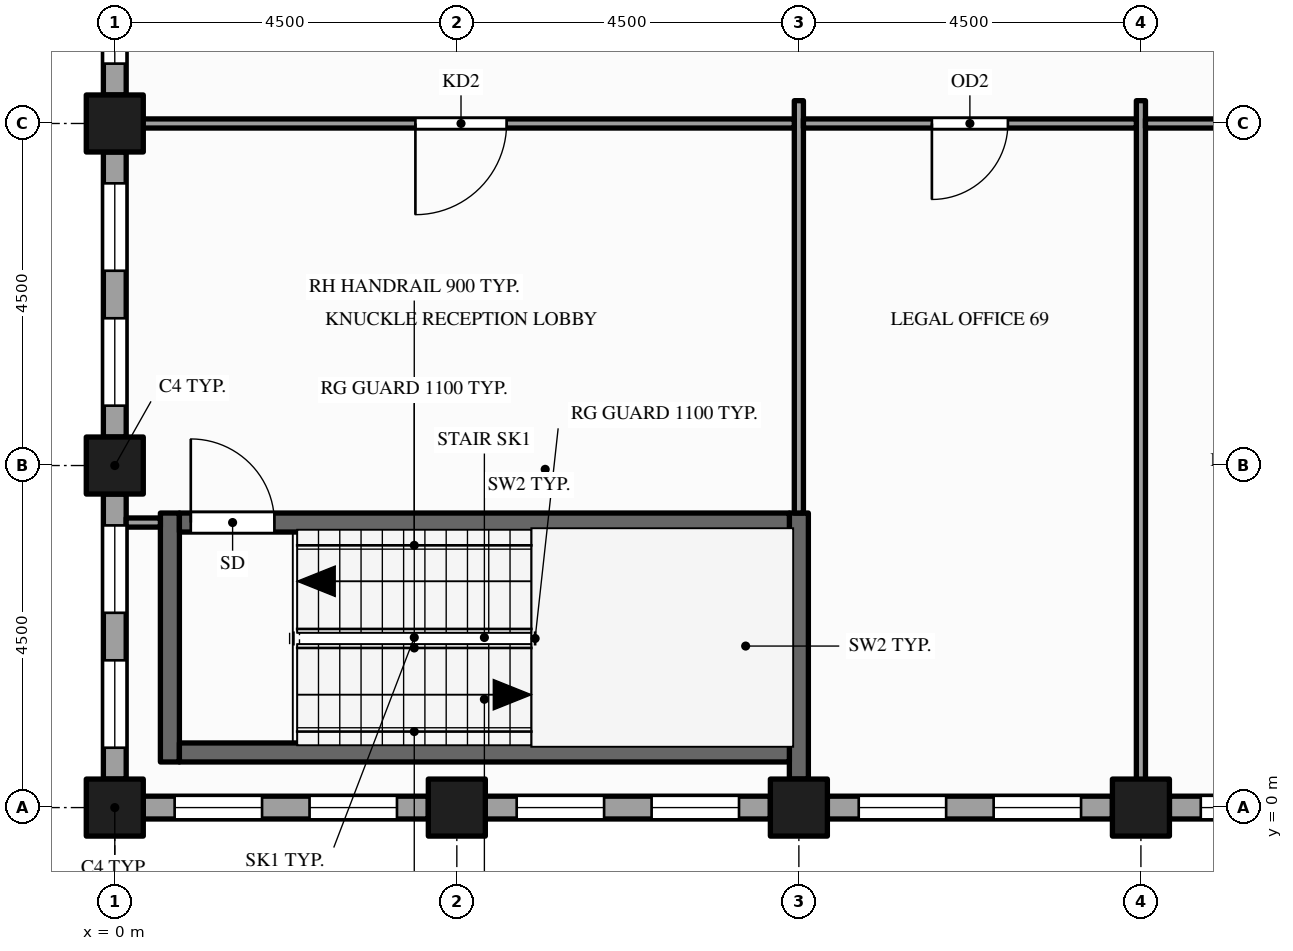
"""IFC4 building model, lengths in metres.
Left out: names, types, materials, properties, quantities, classifications, styles, units other than length and angle.
Written with IfcOpenShell. Run it as: python <this file> out.ifc"""

import sys

from ifc_helpers import new_model, si_unit, direction, frame, frame_2d, origin, origin_2d, place, context, subcontext, project, spatial, rectangle, hollow_rectangle, extrude, element, fill, save


model = new_model("IFC4")
c1 = context("Model", 3, precision=1e-05, world=origin(), true_north=direction((0.0, 1.0)))
c2 = subcontext(c1, "Body", "Model", "MODEL_VIEW")
j1 = project(units=[si_unit("LENGTHUNIT", "METRE"), si_unit("PLANEANGLEUNIT", "RADIAN")], contexts=[c1])
p1 = place(None, origin())
s1 = spatial("IfcSite", under=j1, at=p1, CompositionType="ELEMENT")
p2 = place(p1, origin())
s2 = spatial("IfcBuilding", under=s1, at=p2, CompositionType="ELEMENT")
p3 = place(p2, frame((0.0, 0.0, 199.0)))
s3 = spatial("IfcBuildingStorey", under=s2, at=p3, CompositionType="ELEMENT", Elevation=199.0)
for number, where, z_axis, x_axis in (
    (1, (0.0, 0.0, -0.15), (0.0, 0.0, 1.0), (1.0, 0.0, 0.0)),
    (2, (0.0, 4.5, -0.15), (0.0, 0.0, 1.0), (1.0, 0.0, 0.0)),
    (3, (0.0, 9.0, -0.15), (0.0, 0.0, 1.0), (1.0, 0.0, 0.0)),
    (4, (4.5, 0.0, -0.15), (0.0, 0.0, 1.0), (1.0, 0.0, 0.0)),
    (5, (9.0, 0.0, -0.15), (0.0, 0.0, 1.0), (1.0, 0.0, 0.0)),
    (6, (13.5, 0.0, -0.15), (0.0, 0.0, 1.0), (1.0, 0.0, 0.0)),
):
    element("IfcColumn", number, at=place(p3, frame(where, z_axis=z_axis, x_axis=x_axis)), inside=s3, PredefinedType="COLUMN", context=c2, shape_type="SweptSolid", body=[
        extrude(hollow_rectangle(XDim=0.75, YDim=0.75, WallThickness=0.036, at=origin_2d()), origin(), (0.0, 0.0, 1.0), 4.0),
    ])
p4 = place(p3, frame((0.0, 13.125, 0.0), z_axis=(0.0, 0.0, 1.0), x_axis=(0.0, -1.0, 0.0)))
e7 = element("IfcWall", 7, at=p4, inside=s3, PredefinedType="STANDARD", context=c2, shape_type="SweptSolid", body=[
    extrude(rectangle(XDim=3.75, YDim=0.3, at=frame_2d((1.875, 0.0))), origin(), (0.0, 0.0, 1.0), 3.157),
])
p5 = place(p4, frame((0.413, 0.0, 0.9)))
e8 = element("IfcOpeningElement", 8, at=p5, cuts=e7, PredefinedType="OPENING", context=c2, shape_type="SweptSolid", body=[
    extrude(rectangle(XDim=1.15, YDim=2.0, at=frame_2d((0.575, 1.0))), frame((0.0, 0.16, 0.0), z_axis=(0.0, -1.0, 0.0), x_axis=(1.0, 0.0, 0.0)), (0.0, 0.0, 1.0), 0.32),
])
p6 = place(p4, frame((2.188, 0.0, 0.9)))
e9 = element("IfcOpeningElement", 9, at=p6, cuts=e7, PredefinedType="OPENING", context=c2, shape_type="SweptSolid", body=[
    extrude(rectangle(XDim=1.15, YDim=2.0, at=frame_2d((0.575, 1.0))), frame((0.0, 0.16, 0.0), z_axis=(0.0, -1.0, 0.0), x_axis=(1.0, 0.0, 0.0)), (0.0, 0.0, 1.0), 0.32),
])
p7 = place(p3, frame((0.0, 8.625, 0.0), z_axis=(0.0, 0.0, 1.0), x_axis=(0.0, -1.0, 0.0)))
e10 = element("IfcWall", 10, at=p7, inside=s3, PredefinedType="STANDARD", context=c2, shape_type="SweptSolid", body=[
    extrude(rectangle(XDim=3.75, YDim=0.3, at=frame_2d((1.875, 0.0))), origin(), (0.0, 0.0, 1.0), 3.157),
])
p8 = place(p7, frame((0.413, 0.0, 0.9)))
e11 = element("IfcOpeningElement", 11, at=p8, cuts=e10, PredefinedType="OPENING", context=c2, shape_type="SweptSolid", body=[
    extrude(rectangle(XDim=1.15, YDim=2.0, at=frame_2d((0.575, 1.0))), frame((0.0, 0.16, 0.0), z_axis=(0.0, -1.0, 0.0), x_axis=(1.0, 0.0, 0.0)), (0.0, 0.0, 1.0), 0.32),
])
p9 = place(p7, frame((2.188, 0.0, 0.9)))
e12 = element("IfcOpeningElement", 12, at=p9, cuts=e10, PredefinedType="OPENING", context=c2, shape_type="SweptSolid", body=[
    extrude(rectangle(XDim=1.15, YDim=2.0, at=frame_2d((0.575, 1.0))), frame((0.0, 0.16, 0.0), z_axis=(0.0, -1.0, 0.0), x_axis=(1.0, 0.0, 0.0)), (0.0, 0.0, 1.0), 0.32),
])
p10 = place(p3, frame((0.0, 4.125, 0.0), z_axis=(0.0, 0.0, 1.0), x_axis=(0.0, -1.0, 0.0)))
e13 = element("IfcWall", 13, at=p10, inside=s3, PredefinedType="STANDARD", context=c2, shape_type="SweptSolid", body=[
    extrude(rectangle(XDim=3.75, YDim=0.3, at=frame_2d((1.875, 0.0))), origin(), (0.0, 0.0, 1.0), 3.157),
])
p11 = place(p10, frame((0.413, 0.0, 0.9)))
e14 = element("IfcOpeningElement", 14, at=p11, cuts=e13, PredefinedType="OPENING", context=c2, shape_type="SweptSolid", body=[
    extrude(rectangle(XDim=1.15, YDim=2.0, at=frame_2d((0.575, 1.0))), frame((0.0, 0.16, 0.0), z_axis=(0.0, -1.0, 0.0), x_axis=(1.0, 0.0, 0.0)), (0.0, 0.0, 1.0), 0.32),
])
p12 = place(p10, frame((2.188, 0.0, 0.9)))
e15 = element("IfcOpeningElement", 15, at=p12, cuts=e13, PredefinedType="OPENING", context=c2, shape_type="SweptSolid", body=[
    extrude(rectangle(XDim=1.15, YDim=2.0, at=frame_2d((0.575, 1.0))), frame((0.0, 0.16, 0.0), z_axis=(0.0, -1.0, 0.0), x_axis=(1.0, 0.0, 0.0)), (0.0, 0.0, 1.0), 0.32),
])
p13 = place(p3, frame((0.375, 0.0, 0.0), z_axis=(0.0, 0.0, 1.0), x_axis=(1.0, 0.0, 0.0)))
e16 = element("IfcWall", 16, at=p13, inside=s3, PredefinedType="STANDARD", context=c2, shape_type="SweptSolid", body=[
    extrude(rectangle(XDim=3.75, YDim=0.3, at=frame_2d((1.875, 0.0))), origin(), (0.0, 0.0, 1.0), 3.157),
])
p14 = place(p13, frame((0.413, 0.0, 0.9)))
e17 = element("IfcOpeningElement", 17, at=p14, cuts=e16, PredefinedType="OPENING", context=c2, shape_type="SweptSolid", body=[
    extrude(rectangle(XDim=1.15, YDim=2.0, at=frame_2d((0.575, 1.0))), frame((0.0, 0.16, 0.0), z_axis=(0.0, -1.0, 0.0), x_axis=(1.0, 0.0, 0.0)), (0.0, 0.0, 1.0), 0.32),
])
p15 = place(p13, frame((2.188, 0.0, 0.9)))
e18 = element("IfcOpeningElement", 18, at=p15, cuts=e16, PredefinedType="OPENING", context=c2, shape_type="SweptSolid", body=[
    extrude(rectangle(XDim=1.15, YDim=2.0, at=frame_2d((0.575, 1.0))), frame((0.0, 0.16, 0.0), z_axis=(0.0, -1.0, 0.0), x_axis=(1.0, 0.0, 0.0)), (0.0, 0.0, 1.0), 0.32),
])
p16 = place(p3, frame((4.875, 0.0, 0.0), z_axis=(0.0, 0.0, 1.0), x_axis=(1.0, 0.0, 0.0)))
e19 = element("IfcWall", 19, at=p16, inside=s3, PredefinedType="STANDARD", context=c2, shape_type="SweptSolid", body=[
    extrude(rectangle(XDim=3.75, YDim=0.3, at=frame_2d((1.875, 0.0))), origin(), (0.0, 0.0, 1.0), 3.157),
])
p17 = place(p16, frame((0.413, 0.0, 0.9)))
e20 = element("IfcOpeningElement", 20, at=p17, cuts=e19, PredefinedType="OPENING", context=c2, shape_type="SweptSolid", body=[
    extrude(rectangle(XDim=1.15, YDim=2.0, at=frame_2d((0.575, 1.0))), frame((0.0, 0.16, 0.0), z_axis=(0.0, -1.0, 0.0), x_axis=(1.0, 0.0, 0.0)), (0.0, 0.0, 1.0), 0.32),
])
p18 = place(p16, frame((2.188, 0.0, 0.9)))
e21 = element("IfcOpeningElement", 21, at=p18, cuts=e19, PredefinedType="OPENING", context=c2, shape_type="SweptSolid", body=[
    extrude(rectangle(XDim=1.15, YDim=2.0, at=frame_2d((0.575, 1.0))), frame((0.0, 0.16, 0.0), z_axis=(0.0, -1.0, 0.0), x_axis=(1.0, 0.0, 0.0)), (0.0, 0.0, 1.0), 0.32),
])
p19 = place(p3, frame((9.375, 0.0, 0.0), z_axis=(0.0, 0.0, 1.0), x_axis=(1.0, 0.0, 0.0)))
e22 = element("IfcWall", 22, at=p19, inside=s3, PredefinedType="STANDARD", context=c2, shape_type="SweptSolid", body=[
    extrude(rectangle(XDim=3.75, YDim=0.3, at=frame_2d((1.875, 0.0))), origin(), (0.0, 0.0, 1.0), 2.87),
])
p20 = place(p19, frame((0.413, 0.0, 0.9)))
e23 = element("IfcOpeningElement", 23, at=p20, cuts=e22, PredefinedType="OPENING", context=c2, shape_type="SweptSolid", body=[
    extrude(rectangle(XDim=1.15, YDim=1.75, at=frame_2d((0.575, 0.875))), frame((0.0, 0.16, 0.0), z_axis=(0.0, -1.0, 0.0), x_axis=(1.0, 0.0, 0.0)), (0.0, 0.0, 1.0), 0.32),
])
p21 = place(p19, frame((2.188, 0.0, 0.9)))
e24 = element("IfcOpeningElement", 24, at=p21, cuts=e22, PredefinedType="OPENING", context=c2, shape_type="SweptSolid", body=[
    extrude(rectangle(XDim=1.15, YDim=1.75, at=frame_2d((0.575, 0.875))), frame((0.0, 0.16, 0.0), z_axis=(0.0, -1.0, 0.0), x_axis=(1.0, 0.0, 0.0)), (0.0, 0.0, 1.0), 0.32),
])
p22 = place(p3, frame((13.875, 0.0, 0.0), z_axis=(0.0, 0.0, 1.0), x_axis=(1.0, 0.0, 0.0)))
e25 = element("IfcWall", 25, at=p22, inside=s3, PredefinedType="STANDARD", context=c2, shape_type="SweptSolid", body=[
    extrude(rectangle(XDim=3.75, YDim=0.3, at=frame_2d((1.875, 0.0))), origin(), (0.0, 0.0, 1.0), 2.87),
])
p23 = place(p22, frame((0.413, 0.0, 0.9)))
e26 = element("IfcOpeningElement", 26, at=p23, cuts=e25, PredefinedType="OPENING", context=c2, shape_type="SweptSolid", body=[
    extrude(rectangle(XDim=1.15, YDim=1.75, at=frame_2d((0.575, 0.875))), frame((0.0, 0.16, 0.0), z_axis=(0.0, -1.0, 0.0), x_axis=(1.0, 0.0, 0.0)), (0.0, 0.0, 1.0), 0.32),
])
p24 = place(p22, frame((2.188, 0.0, 0.9)))
e27 = element("IfcOpeningElement", 27, at=p24, cuts=e25, PredefinedType="OPENING", context=c2, shape_type="SweptSolid", body=[
    extrude(rectangle(XDim=1.15, YDim=1.75, at=frame_2d((0.575, 0.875))), frame((0.0, 0.16, 0.0), z_axis=(0.0, -1.0, 0.0), x_axis=(1.0, 0.0, 0.0)), (0.0, 0.0, 1.0), 0.32),
])
p25 = place(p3, frame((0.725, 0.6, 0.0), z_axis=(0.0, 0.0, 1.0), x_axis=(0.0, 1.0, 0.0)))
e28 = element("IfcWall", 28, at=p25, inside=s3, PredefinedType="SHEAR", context=c2, shape_type="SweptSolid", body=[
    extrude(rectangle(XDim=3.275, YDim=0.25, at=frame_2d((1.637, 0.0))), origin(), (0.0, 0.0, 1.0), 3.85),
])
p26 = place(p3, frame((9.0, 0.375, 0.0), z_axis=(0.0, 0.0, 1.0), x_axis=(0.0, 1.0, 0.0)))
e29 = element("IfcWall", 29, at=p26, inside=s3, PredefinedType="SHEAR", context=c2, shape_type="SweptSolid", body=[
    extrude(rectangle(XDim=3.5, YDim=0.25, at=frame_2d((1.75, 0.0))), origin(), (0.0, 0.0, 1.0), 3.85),
])
p27 = place(p3, frame((9.0, 3.875, 0.0), z_axis=(0.0, 0.0, 1.0), x_axis=(0.0, 1.0, 0.0)))
e30 = element("IfcWall", 30, at=p27, inside=s3, PredefinedType="PARTITIONING", context=c2, shape_type="SweptSolid", body=[
    extrude(rectangle(XDim=5.425, YDim=0.12, at=frame_2d((2.712, 0.0))), origin(), (0.0, 0.0, 1.0), 2.87),
])
p28 = place(p3, frame((13.5, 0.15, 0.0), z_axis=(0.0, 0.0, 1.0), x_axis=(0.0, 1.0, 0.0)))
e31 = element("IfcWall", 31, at=p28, inside=s3, PredefinedType="PARTITIONING", context=c2, shape_type="SweptSolid", body=[
    extrude(rectangle(XDim=9.15, YDim=0.12, at=frame_2d((4.575, 0.0))), origin(), (0.0, 0.0, 1.0), 2.87),
])
p29 = place(p3, frame((0.85, 0.725, 0.0), z_axis=(0.0, 0.0, 1.0), x_axis=(1.0, 0.0, 0.0)))
e32 = element("IfcWall", 32, at=p29, inside=s3, PredefinedType="SHEAR", context=c2, shape_type="SweptSolid", body=[
    extrude(rectangle(XDim=8.025, YDim=0.25, at=frame_2d((4.012, 0.0))), origin(), (0.0, 0.0, 1.0), 3.85),
])
p30 = place(p3, frame((0.15, 3.75, 0.0), z_axis=(0.0, 0.0, 1.0), x_axis=(1.0, 0.0, 0.0)))
e33 = element("IfcWall", 33, at=p30, inside=s3, PredefinedType="PARTITIONING", context=c2, shape_type="SweptSolid", body=[
    extrude(rectangle(XDim=0.45, YDim=0.12, at=frame_2d((0.225, 0.0))), origin(), (0.0, 0.0, 1.0), 3.85),
])
p31 = place(p3, frame((0.85, 3.75, 0.0), z_axis=(0.0, 0.0, 1.0), x_axis=(1.0, 0.0, 0.0)))
e34 = element("IfcWall", 34, at=p31, inside=s3, PredefinedType="SHEAR", context=c2, shape_type="SweptSolid", body=[
    extrude(rectangle(XDim=8.025, YDim=0.25, at=frame_2d((4.012, 0.0))), origin(), (0.0, 0.0, 1.0), 3.85),
])
p32 = place(p31, frame((0.15, 0.0, 0.0)))
e35 = element("IfcOpeningElement", 35, at=p32, cuts=e34, PredefinedType="OPENING", context=c2, shape_type="SweptSolid", body=[
    extrude(rectangle(XDim=1.1, YDim=2.1, at=frame_2d((0.55, 1.05))), frame((0.0, 0.135, 0.0), z_axis=(0.0, -1.0, 0.0), x_axis=(1.0, 0.0, 0.0)), (0.0, 0.0, 1.0), 0.27),
])
p33 = place(p3, frame((0.15, 9.0, 0.0), z_axis=(0.0, 0.0, 1.0), x_axis=(1.0, 0.0, 0.0)))
e36 = element("IfcWall", 36, at=p33, inside=s3, PredefinedType="PARTITIONING", context=c2, shape_type="SweptSolid", body=[
    extrude(rectangle(XDim=8.79, YDim=0.12, at=frame_2d((4.395, 0.0))), origin(), (0.0, 0.0, 1.0), 2.87),
])
p34 = place(p33, frame((3.805, 0.0, 0.0)))
e37 = element("IfcOpeningElement", 37, at=p34, cuts=e36, PredefinedType="OPENING", context=c2, shape_type="SweptSolid", body=[
    extrude(rectangle(XDim=1.2, YDim=2.1, at=frame_2d((0.6, 1.05))), frame((0.0, 0.07, 0.0), z_axis=(0.0, -1.0, 0.0), x_axis=(1.0, 0.0, 0.0)), (0.0, 0.0, 1.0), 0.14),
])
p35 = place(p3, frame((9.06, 9.0, 0.0), z_axis=(0.0, 0.0, 1.0), x_axis=(1.0, 0.0, 0.0)))
e38 = element("IfcWall", 38, at=p35, inside=s3, PredefinedType="PARTITIONING", context=c2, shape_type="SweptSolid", body=[
    extrude(rectangle(XDim=4.38, YDim=0.12, at=frame_2d((2.19, 0.0))), origin(), (0.0, 0.0, 1.0), 2.87),
])
p36 = place(p35, frame((1.69, 0.0, 0.0)))
e39 = element("IfcOpeningElement", 39, at=p36, cuts=e38, PredefinedType="OPENING", context=c2, shape_type="SweptSolid", body=[
    extrude(rectangle(XDim=1.0, YDim=2.1, at=frame_2d((0.5, 1.05))), frame((0.0, 0.07, 0.0), z_axis=(0.0, -1.0, 0.0), x_axis=(1.0, 0.0, 0.0)), (0.0, 0.0, 1.0), 0.14),
])
p37 = place(p3, frame((13.56, 9.0, 0.0), z_axis=(0.0, 0.0, 1.0), x_axis=(1.0, 0.0, 0.0)))
e40 = element("IfcWall", 40, at=p37, inside=s3, PredefinedType="PARTITIONING", context=c2, shape_type="SweptSolid", body=[
    extrude(rectangle(XDim=4.38, YDim=0.12, at=frame_2d((2.19, 0.0))), origin(), (0.0, 0.0, 1.0), 2.87),
])
p38 = place(p37, frame((1.74, 0.0, 0.0)))
e41 = element("IfcOpeningElement", 41, at=p38, cuts=e40, PredefinedType="OPENING", context=c2, shape_type="SweptSolid", body=[
    extrude(rectangle(XDim=0.9, YDim=2.1, at=frame_2d((0.45, 1.05))), frame((0.0, 0.07, 0.0), z_axis=(0.0, -1.0, 0.0), x_axis=(1.0, 0.0, 0.0)), (0.0, 0.0, 1.0), 0.14),
])
p39 = place(p6, origin())
e42 = element("IfcWindow", 42, at=p39, inside=s3, PartitioningType="SINGLE_PANEL", PredefinedType="WINDOW", context=c2, shape_type="SweptSolid", body=[
    extrude(rectangle(XDim=1.15, YDim=2.0, at=frame_2d((0.575, 1.0))), frame((0.0, 0.03, 0.0), z_axis=(0.0, -1.0, 0.0), x_axis=(1.0, 0.0, 0.0)), (0.0, 0.0, 1.0), 0.06),
])
fill(e9, e42)
p40 = place(p8, origin())
e43 = element("IfcWindow", 43, at=p40, inside=s3, PartitioningType="SINGLE_PANEL", PredefinedType="WINDOW", context=c2, shape_type="SweptSolid", body=[
    extrude(rectangle(XDim=1.15, YDim=2.0, at=frame_2d((0.575, 1.0))), frame((0.0, 0.03, 0.0), z_axis=(0.0, -1.0, 0.0), x_axis=(1.0, 0.0, 0.0)), (0.0, 0.0, 1.0), 0.06),
])
fill(e11, e43)
p41 = place(p9, origin())
e44 = element("IfcWindow", 44, at=p41, inside=s3, PartitioningType="SINGLE_PANEL", PredefinedType="WINDOW", context=c2, shape_type="SweptSolid", body=[
    extrude(rectangle(XDim=1.15, YDim=2.0, at=frame_2d((0.575, 1.0))), frame((0.0, 0.03, 0.0), z_axis=(0.0, -1.0, 0.0), x_axis=(1.0, 0.0, 0.0)), (0.0, 0.0, 1.0), 0.06),
])
fill(e12, e44)
p42 = place(p11, origin())
e45 = element("IfcWindow", 45, at=p42, inside=s3, PartitioningType="SINGLE_PANEL", PredefinedType="WINDOW", context=c2, shape_type="SweptSolid", body=[
    extrude(rectangle(XDim=1.15, YDim=2.0, at=frame_2d((0.575, 1.0))), frame((0.0, 0.03, 0.0), z_axis=(0.0, -1.0, 0.0), x_axis=(1.0, 0.0, 0.0)), (0.0, 0.0, 1.0), 0.06),
])
fill(e14, e45)
p43 = place(p12, origin())
e46 = element("IfcWindow", 46, at=p43, inside=s3, PartitioningType="SINGLE_PANEL", PredefinedType="WINDOW", context=c2, shape_type="SweptSolid", body=[
    extrude(rectangle(XDim=1.15, YDim=2.0, at=frame_2d((0.575, 1.0))), frame((0.0, 0.03, 0.0), z_axis=(0.0, -1.0, 0.0), x_axis=(1.0, 0.0, 0.0)), (0.0, 0.0, 1.0), 0.06),
])
fill(e15, e46)
p44 = place(p14, origin())
e47 = element("IfcWindow", 47, at=p44, inside=s3, PartitioningType="SINGLE_PANEL", PredefinedType="WINDOW", context=c2, shape_type="SweptSolid", body=[
    extrude(rectangle(XDim=1.15, YDim=2.0, at=frame_2d((0.575, 1.0))), frame((0.0, 0.03, 0.0), z_axis=(0.0, -1.0, 0.0), x_axis=(1.0, 0.0, 0.0)), (0.0, 0.0, 1.0), 0.06),
])
fill(e17, e47)
p45 = place(p15, origin())
e48 = element("IfcWindow", 48, at=p45, inside=s3, PartitioningType="SINGLE_PANEL", PredefinedType="WINDOW", context=c2, shape_type="SweptSolid", body=[
    extrude(rectangle(XDim=1.15, YDim=2.0, at=frame_2d((0.575, 1.0))), frame((0.0, 0.03, 0.0), z_axis=(0.0, -1.0, 0.0), x_axis=(1.0, 0.0, 0.0)), (0.0, 0.0, 1.0), 0.06),
])
fill(e18, e48)
p46 = place(p17, origin())
e49 = element("IfcWindow", 49, at=p46, inside=s3, PartitioningType="SINGLE_PANEL", PredefinedType="WINDOW", context=c2, shape_type="SweptSolid", body=[
    extrude(rectangle(XDim=1.15, YDim=2.0, at=frame_2d((0.575, 1.0))), frame((0.0, 0.03, 0.0), z_axis=(0.0, -1.0, 0.0), x_axis=(1.0, 0.0, 0.0)), (0.0, 0.0, 1.0), 0.06),
])
fill(e20, e49)
p47 = place(p18, origin())
e50 = element("IfcWindow", 50, at=p47, inside=s3, PartitioningType="SINGLE_PANEL", PredefinedType="WINDOW", context=c2, shape_type="SweptSolid", body=[
    extrude(rectangle(XDim=1.15, YDim=2.0, at=frame_2d((0.575, 1.0))), frame((0.0, 0.03, 0.0), z_axis=(0.0, -1.0, 0.0), x_axis=(1.0, 0.0, 0.0)), (0.0, 0.0, 1.0), 0.06),
])
fill(e21, e50)
p48 = place(p20, origin())
e51 = element("IfcWindow", 51, at=p48, inside=s3, PartitioningType="SINGLE_PANEL", PredefinedType="WINDOW", context=c2, shape_type="SweptSolid", body=[
    extrude(rectangle(XDim=1.15, YDim=1.75, at=frame_2d((0.575, 0.875))), frame((0.0, 0.03, 0.0), z_axis=(0.0, -1.0, 0.0), x_axis=(1.0, 0.0, 0.0)), (0.0, 0.0, 1.0), 0.06),
])
fill(e23, e51)
p49 = place(p21, origin())
e52 = element("IfcWindow", 52, at=p49, inside=s3, PartitioningType="SINGLE_PANEL", PredefinedType="WINDOW", context=c2, shape_type="SweptSolid", body=[
    extrude(rectangle(XDim=1.15, YDim=1.75, at=frame_2d((0.575, 0.875))), frame((0.0, 0.03, 0.0), z_axis=(0.0, -1.0, 0.0), x_axis=(1.0, 0.0, 0.0)), (0.0, 0.0, 1.0), 0.06),
])
fill(e24, e52)
p50 = place(p23, origin())
e53 = element("IfcWindow", 53, at=p50, inside=s3, PartitioningType="SINGLE_PANEL", PredefinedType="WINDOW", context=c2, shape_type="SweptSolid", body=[
    extrude(rectangle(XDim=1.15, YDim=1.75, at=frame_2d((0.575, 0.875))), frame((0.0, 0.03, 0.0), z_axis=(0.0, -1.0, 0.0), x_axis=(1.0, 0.0, 0.0)), (0.0, 0.0, 1.0), 0.06),
])
fill(e26, e53)
p51 = place(p32, origin())
e54 = element("IfcDoor", 54, at=p51, inside=s3, OperationType="SINGLE_SWING_LEFT", PredefinedType="DOOR", context=c2, shape_type="SweptSolid", body=[
    extrude(rectangle(XDim=1.1, YDim=2.1, at=frame_2d((0.55, 1.05))), frame((0.0, 0.025, 0.0), z_axis=(0.0, -1.0, 0.0), x_axis=(1.0, 0.0, 0.0)), (0.0, 0.0, 1.0), 0.05),
])
fill(e35, e54)
p52 = place(p34, origin())
e55 = element("IfcDoor", 55, at=p52, inside=s3, OperationType="SINGLE_SWING_LEFT", PredefinedType="DOOR", context=c2, shape_type="SweptSolid", body=[
    extrude(rectangle(XDim=1.2, YDim=2.1, at=frame_2d((0.6, 1.05))), frame((0.0, 0.025, 0.0), z_axis=(0.0, -1.0, 0.0), x_axis=(1.0, 0.0, 0.0)), (0.0, 0.0, 1.0), 0.05),
])
fill(e37, e55)
p53 = place(p36, origin())
e56 = element("IfcDoor", 56, at=p53, inside=s3, OperationType="SINGLE_SWING_LEFT", PredefinedType="DOOR", context=c2, shape_type="SweptSolid", body=[
    extrude(rectangle(XDim=1.0, YDim=2.1, at=frame_2d((0.5, 1.05))), frame((0.0, 0.025, 0.0), z_axis=(0.0, -1.0, 0.0), x_axis=(1.0, 0.0, 0.0)), (0.0, 0.0, 1.0), 0.05),
])
fill(e39, e56)
save(model, sys.argv[1])
